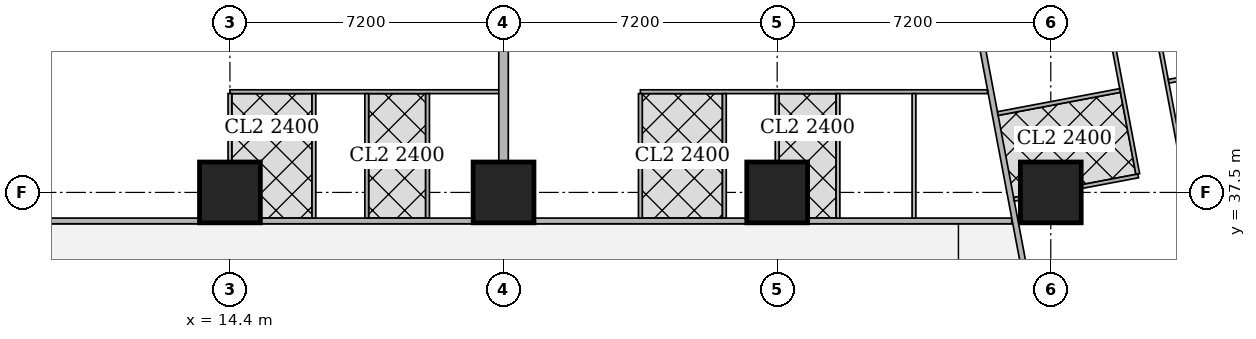
"""IFC4 building model, lengths in metres.
Left out: names, types, materials, properties, quantities, classifications, styles, units other than length and angle.
Written with IfcOpenShell. Run it as: python <this file> out.ifc"""

import sys

from ifc_helpers import new_model, si_unit, direction, frame, frame_2d, origin, origin_2d, place, context, subcontext, project, spatial, rectangle, extrude, element, fill, save


model = new_model("IFC4")
c1 = context("Model", 3, precision=1e-05, world=origin(), true_north=direction((0.0, 1.0)))
c2 = subcontext(c1, "Body", "Model", "MODEL_VIEW")
j1 = project(units=[si_unit("LENGTHUNIT", "METRE"), si_unit("PLANEANGLEUNIT", "RADIAN")], contexts=[c1])
p1 = place(None, origin())
s1 = spatial("IfcSite", under=j1, at=p1, CompositionType="ELEMENT")
p2 = place(p1, origin())
s2 = spatial("IfcBuilding", under=s1, at=p2, CompositionType="ELEMENT")
p3 = place(p2, frame((0.0, 0.0, 100.4)))
s3 = spatial("IfcBuildingStorey", under=s2, at=p3, CompositionType="ELEMENT", Elevation=100.4)
for number, where, z_axis, x_axis in (
    (1, (14.4, 37.5, 0.0), (0.0, 0.0, 1.0), (1.0, 0.0, 0.0)),
    (2, (21.6, 37.5, 0.0), (0.0, 0.0, 1.0), (1.0, 0.0, 0.0)),
    (3, (28.8, 37.5, 0.0), (0.0, 0.0, 1.0), (1.0, 0.0, 0.0)),
    (4, (36.0, 37.5, 0.0), (0.0, 0.0, 1.0), (1.0, 0.0, 0.0)),
):
    element("IfcColumn", number, at=place(p3, frame(where, z_axis=z_axis, x_axis=x_axis)), inside=s3, PredefinedType="COLUMN", context=c2, shape_type="SweptSolid", body=[
        extrude(rectangle(XDim=1.6, YDim=1.6, at=origin_2d()), origin(), (0.0, 0.0, 1.0), 3.75),
    ])
p4 = place(p3, frame((8.1, 36.75, 0.0), z_axis=(0.0, 0.0, 1.0), x_axis=(1.0, 0.0, 0.0)))
e5 = element("IfcWall", 5, at=p4, inside=s3, PredefinedType="SOLIDWALL", context=c2, shape_type="SweptSolid", body=[
    extrude(rectangle(XDim=5.499, YDim=0.15, at=frame_2d((2.75, 0.0))), origin(), (0.0, 0.0, 1.0), 3.5),
])
p5 = place(p4, frame((2.725, 0.0, 0.0)))
e6 = element("IfcOpeningElement", 6, at=p5, cuts=e5, PredefinedType="OPENING", context=c2, shape_type="SweptSolid", body=[
    extrude(rectangle(XDim=1.0, YDim=2.1, at=frame_2d((0.5, 1.05))), frame((0.0, 0.085, 0.0), z_axis=(0.0, -1.0, 0.0), x_axis=(1.0, 0.0, 0.0)), (0.0, 0.0, 1.0), 0.17),
])
p6 = place(p3, frame((15.201, 36.75, 0.0), z_axis=(0.0, 0.0, 1.0), x_axis=(1.0, 0.0, 0.0)))
e7 = element("IfcWall", 7, at=p6, inside=s3, PredefinedType="SOLIDWALL", context=c2, shape_type="SweptSolid", body=[
    extrude(rectangle(XDim=5.598, YDim=0.15, at=frame_2d((2.799, 0.0))), origin(), (0.0, 0.0, 1.0), 3.5),
])
p7 = place(p3, frame((22.401, 36.75, 0.0), z_axis=(0.0, 0.0, 1.0), x_axis=(1.0, 0.0, 0.0)))
e8 = element("IfcWall", 8, at=p7, inside=s3, PredefinedType="SOLIDWALL", context=c2, shape_type="SweptSolid", body=[
    extrude(rectangle(XDim=5.598, YDim=0.15, at=frame_2d((2.799, 0.0))), origin(), (0.0, 0.0, 1.0), 3.5),
])
p8 = place(p7, frame((0.699, 0.0, 0.0)))
e9 = element("IfcOpeningElement", 9, at=p8, cuts=e8, PredefinedType="OPENING", context=c2, shape_type="SweptSolid", body=[
    extrude(rectangle(XDim=1.0, YDim=2.1, at=frame_2d((0.5, 1.05))), frame((0.0, 0.085, 0.0), z_axis=(0.0, -1.0, 0.0), x_axis=(1.0, 0.0, 0.0)), (0.0, 0.0, 1.0), 0.17),
])
p9 = place(p3, frame((29.601, 36.75, 0.0), z_axis=(0.0, 0.0, 1.0), x_axis=(1.0, 0.0, 0.0)))
e10 = element("IfcWall", 10, at=p9, inside=s3, PredefinedType="SOLIDWALL", context=c2, shape_type="SweptSolid", body=[
    extrude(rectangle(XDim=5.372, YDim=0.15, at=frame_2d((2.686, 0.0))), origin(), (0.0, 0.0, 1.0), 3.5),
])
p10 = place(p3, frame((33.382, 45.65, 0.0), z_axis=(0.0, 0.0, 1.0), x_axis=(0.185593544777, -0.982626600565, 0.0)))
e11 = element("IfcWall", 11, at=p10, inside=s3, PredefinedType="SOLIDWALL", context=c2, shape_type="SweptSolid", body=[
    extrude(rectangle(XDim=47.118, YDim=0.15, at=frame_2d((23.559, 0.0))), origin(), (0.0, 0.0, 1.0), 2.2),
])
p11 = place(p10, frame((10.662, 0.0, 0.0)))
e12 = element("IfcOpeningElement", 12, at=p11, cuts=e11, PredefinedType="OPENING", context=c2, shape_type="SweptSolid", body=[
    extrude(rectangle(XDim=1.0, YDim=2.1, at=frame_2d((0.5, 1.05))), frame((0.0, 0.085, 0.0), z_axis=(0.0, -1.0, 0.0), x_axis=(1.0, 0.0, 0.0)), (0.0, 0.0, 1.0), 0.17),
])
p12 = place(p10, frame((15.237, 0.0, 0.0)))
e13 = element("IfcOpeningElement", 13, at=p12, cuts=e11, PredefinedType="OPENING", context=c2, shape_type="SweptSolid", body=[
    extrude(rectangle(XDim=1.0, YDim=2.1, at=frame_2d((0.5, 1.05))), frame((0.0, 0.085, 0.0), z_axis=(0.0, -1.0, 0.0), x_axis=(1.0, 0.0, 0.0)), (0.0, 0.0, 1.0), 0.17),
])
p13 = place(p10, frame((27.341, 0.0, 0.0)))
e14 = element("IfcOpeningElement", 14, at=p13, cuts=e11, PredefinedType="OPENING", context=c2, shape_type="SweptSolid", body=[
    extrude(rectangle(XDim=1.0, YDim=2.1, at=frame_2d((0.5, 1.05))), frame((0.0, 0.085, 0.0), z_axis=(0.0, -1.0, 0.0), x_axis=(1.0, 0.0, 0.0)), (0.0, 0.0, 1.0), 0.17),
])
p14 = place(p10, frame((33.833, 0.0, 0.0)))
e15 = element("IfcOpeningElement", 15, at=p14, cuts=e11, PredefinedType="OPENING", context=c2, shape_type="SweptSolid", body=[
    extrude(rectangle(XDim=1.0, YDim=2.1, at=frame_2d((0.5, 1.05))), frame((0.0, 0.085, 0.0), z_axis=(0.0, -1.0, 0.0), x_axis=(1.0, 0.0, 0.0)), (0.0, 0.0, 1.0), 0.17),
])
p15 = place(p3, frame((38.862, 41.42, 0.0), z_axis=(0.0, 0.0, 1.0), x_axis=(0.185332907641, -0.982675792592, 0.0)))
e16 = element("IfcWall", 16, at=p15, inside=s3, PredefinedType="PARTITIONING", context=c2, shape_type="SweptSolid", body=[
    extrude(rectangle(XDim=4.629, YDim=0.1, at=frame_2d((2.314, 0.0))), origin(), (0.0, 0.0, 1.0), 3.5),
])
p16 = place(p15, frame((2.22, 0.0, 0.0)))
e17 = element("IfcOpeningElement", 17, at=p16, cuts=e16, PredefinedType="OPENING", context=c2, shape_type="SweptSolid", body=[
    extrude(rectangle(XDim=0.9, YDim=2.1, at=frame_2d((0.45, 1.05))), frame((0.0, 0.06, 0.0), z_axis=(0.0, -1.0, 0.0), x_axis=(1.0, 0.0, 0.0)), (0.0, 0.0, 1.0), 0.12),
])
p17 = place(p3, frame((37.472, 42.309, 0.0), z_axis=(0.0, 0.0, 1.0), x_axis=(0.185641287362, -0.982617581985, 0.0)))
e18 = element("IfcWall", 18, at=p17, inside=s3, PredefinedType="PARTITIONING", context=c2, shape_type="SweptSolid", body=[
    extrude(rectangle(XDim=4.402, YDim=0.1, at=frame_2d((2.201, 0.0))), origin(), (0.0, 0.0, 1.0), 3.5),
])
p18 = place(p17, frame((2.854, 0.0, 0.0)))
e19 = element("IfcOpeningElement", 19, at=p18, cuts=e18, PredefinedType="OPENING", context=c2, shape_type="SweptSolid", body=[
    extrude(rectangle(XDim=0.9, YDim=2.1, at=frame_2d((0.45, 1.05))), frame((0.0, 0.06, 0.0), z_axis=(0.0, -1.0, 0.0), x_axis=(1.0, 0.0, 0.0)), (0.0, 0.0, 1.0), 0.12),
])
p19 = place(p3, frame((43.277, 41.212, 0.0), z_axis=(0.0, 0.0, 1.0), x_axis=(-0.982665405803, -0.185387972203, 0.0)))
e20 = element("IfcWall", 20, at=p19, inside=s3, PredefinedType="PARTITIONING", context=c2, shape_type="SweptSolid", body=[
    extrude(rectangle(XDim=4.25, YDim=0.1, at=frame_2d((2.125, 0.0))), origin(), (0.0, 0.0, 1.0), 2.05),
])
p20 = place(p3, frame((37.823, 40.182, 0.0), z_axis=(0.0, 0.0, 1.0), x_axis=(-0.982664729897, -0.18539155487, 0.0)))
e21 = element("IfcWall", 21, at=p20, inside=s3, PredefinedType="PARTITIONING", context=c2, shape_type="SweptSolid", body=[
    extrude(rectangle(XDim=3.274, YDim=0.1, at=frame_2d((1.637, 0.0))), origin(), (0.0, 0.0, 1.0), 3.5),
])
p21 = place(p3, frame((38.299, 37.935, 0.0), z_axis=(0.0, 0.0, 1.0), x_axis=(-0.982536828695, -0.186068213993, 0.0)))
e22 = element("IfcWall", 22, at=p21, inside=s3, PredefinedType="PARTITIONING", context=c2, shape_type="SweptSolid", body=[
    extrude(rectangle(XDim=1.515, YDim=0.1, at=frame_2d((0.758, 0.0))), origin(), (0.0, 0.0, 1.0), 3.5),
])
p22 = place(p3, frame((35.19, 37.347, 0.0), z_axis=(0.0, 0.0, 1.0), x_axis=(-0.982404955251, -0.186763229514, 0.0)))
e23 = element("IfcWall", 23, at=p22, inside=s3, PredefinedType="PARTITIONING", context=c2, shape_type="SweptSolid", body=[
    extrude(rectangle(XDim=0.161, YDim=0.1, at=frame_2d((0.081, 0.0))), origin(), (0.0, 0.0, 1.0), 3.5),
])
p23 = place(p3, frame((14.4, 40.15, 0.0), z_axis=(0.0, 0.0, 1.0), x_axis=(1.0, 0.0, 0.0)))
e24 = element("IfcWall", 24, at=p23, inside=s3, PredefinedType="PARTITIONING", context=c2, shape_type="SweptSolid", body=[
    extrude(rectangle(XDim=7.075, YDim=0.1, at=frame_2d((3.538, 0.0))), origin(), (0.0, 0.0, 1.0), 3.5),
])
p24 = place(p23, frame((0.655, 0.0, 0.0)))
e25 = element("IfcOpeningElement", 25, at=p24, cuts=e24, PredefinedType="OPENING", context=c2, shape_type="SweptSolid", body=[
    extrude(rectangle(XDim=0.9, YDim=2.1, at=frame_2d((0.45, 1.05))), frame((0.0, 0.06, 0.0), z_axis=(0.0, -1.0, 0.0), x_axis=(1.0, 0.0, 0.0)), (0.0, 0.0, 1.0), 0.12),
])
p25 = place(p23, frame((3.95, 0.0, 0.0)))
e26 = element("IfcOpeningElement", 26, at=p25, cuts=e24, PredefinedType="OPENING", context=c2, shape_type="SweptSolid", body=[
    extrude(rectangle(XDim=0.9, YDim=2.1, at=frame_2d((0.45, 1.05))), frame((0.0, 0.06, 0.0), z_axis=(0.0, -1.0, 0.0), x_axis=(1.0, 0.0, 0.0)), (0.0, 0.0, 1.0), 0.12),
])
p26 = place(p23, frame((2.455, 0.0, 0.0)))
e27 = element("IfcOpeningElement", 27, at=p26, cuts=e24, PredefinedType="OPENING", context=c2, shape_type="SweptSolid", body=[
    extrude(rectangle(XDim=0.9, YDim=2.1, at=frame_2d((0.45, 1.05))), frame((0.0, 0.06, 0.0), z_axis=(0.0, -1.0, 0.0), x_axis=(1.0, 0.0, 0.0)), (0.0, 0.0, 1.0), 0.12),
])
p27 = place(p23, frame((5.75, 0.0, 0.0)))
e28 = element("IfcOpeningElement", 28, at=p27, cuts=e24, PredefinedType="OPENING", context=c2, shape_type="SweptSolid", body=[
    extrude(rectangle(XDim=0.9, YDim=2.1, at=frame_2d((0.45, 1.05))), frame((0.0, 0.06, 0.0), z_axis=(0.0, -1.0, 0.0), x_axis=(1.0, 0.0, 0.0)), (0.0, 0.0, 1.0), 0.12),
])
p28 = place(p3, frame((14.4, 38.301, 0.0), z_axis=(0.0, 0.0, 1.0), x_axis=(0.0, 1.0, 0.0)))
e29 = element("IfcWall", 29, at=p28, inside=s3, PredefinedType="PARTITIONING", context=c2, shape_type="SweptSolid", body=[
    extrude(rectangle(XDim=1.799, YDim=0.1, at=frame_2d((0.899, 0.0))), origin(), (0.0, 0.0, 1.0), 3.5),
])
for number, where, z_axis, x_axis in (
    (30, (18.0, 36.825, 0.0), (0.0, 0.0, 1.0), (0.0, 1.0, 0.0)),
    (31, (16.61, 36.825, 0.0), (0.0, 0.0, 1.0), (0.0, 1.0, 0.0)),
    (32, (19.6, 36.825, 0.0), (0.0, 0.0, 1.0), (0.0, 1.0, 0.0)),
):
    element("IfcWall", number, at=place(p3, frame(where, z_axis=z_axis, x_axis=x_axis)), inside=s3, PredefinedType="PARTITIONING", context=c2, shape_type="SweptSolid", body=[
        extrude(rectangle(XDim=3.275, YDim=0.1, at=frame_2d((1.638, 0.0))), origin(), (0.0, 0.0, 1.0), 3.5),
    ])
p29 = place(p3, frame((25.2, 40.15, 0.0), z_axis=(0.0, 0.0, 1.0), x_axis=(1.0, 0.0, 0.0)))
e33 = element("IfcWall", 33, at=p29, inside=s3, PredefinedType="PARTITIONING", context=c2, shape_type="SweptSolid", body=[
    extrude(rectangle(XDim=9.135, YDim=0.1, at=frame_2d((4.567, 0.0))), origin(), (0.0, 0.0, 1.0), 3.5),
])
p30 = place(p29, frame((0.655, 0.0, 0.0)))
e34 = element("IfcOpeningElement", 34, at=p30, cuts=e33, PredefinedType="OPENING", context=c2, shape_type="SweptSolid", body=[
    extrude(rectangle(XDim=0.9, YDim=2.1, at=frame_2d((0.45, 1.05))), frame((0.0, 0.06, 0.0), z_axis=(0.0, -1.0, 0.0), x_axis=(1.0, 0.0, 0.0)), (0.0, 0.0, 1.0), 0.12),
])
p31 = place(p29, frame((3.95, 0.0, 0.0)))
e35 = element("IfcOpeningElement", 35, at=p31, cuts=e33, PredefinedType="OPENING", context=c2, shape_type="SweptSolid", body=[
    extrude(rectangle(XDim=0.9, YDim=2.1, at=frame_2d((0.45, 1.05))), frame((0.0, 0.06, 0.0), z_axis=(0.0, -1.0, 0.0), x_axis=(1.0, 0.0, 0.0)), (0.0, 0.0, 1.0), 0.12),
])
p32 = place(p29, frame((8.081, 0.0, 0.0)))
e36 = element("IfcOpeningElement", 36, at=p32, cuts=e33, PredefinedType="OPENING", context=c2, shape_type="SweptSolid", body=[
    extrude(rectangle(XDim=0.9, YDim=2.1, at=frame_2d((0.45, 1.05))), frame((0.0, 0.06, 0.0), z_axis=(0.0, -1.0, 0.0), x_axis=(1.0, 0.0, 0.0)), (0.0, 0.0, 1.0), 0.12),
])
p33 = place(p29, frame((2.455, 0.0, 0.0)))
e37 = element("IfcOpeningElement", 37, at=p33, cuts=e33, PredefinedType="OPENING", context=c2, shape_type="SweptSolid", body=[
    extrude(rectangle(XDim=0.9, YDim=2.1, at=frame_2d((0.45, 1.05))), frame((0.0, 0.06, 0.0), z_axis=(0.0, -1.0, 0.0), x_axis=(1.0, 0.0, 0.0)), (0.0, 0.0, 1.0), 0.12),
])
p34 = place(p29, frame((5.75, 0.0, 0.0)))
e38 = element("IfcOpeningElement", 38, at=p34, cuts=e33, PredefinedType="OPENING", context=c2, shape_type="SweptSolid", body=[
    extrude(rectangle(XDim=0.9, YDim=2.1, at=frame_2d((0.45, 1.05))), frame((0.0, 0.06, 0.0), z_axis=(0.0, -1.0, 0.0), x_axis=(1.0, 0.0, 0.0)), (0.0, 0.0, 1.0), 0.12),
])
p35 = place(p3, frame((25.2, 36.825, 0.0), z_axis=(0.0, 0.0, 1.0), x_axis=(0.0, 1.0, 0.0)))
e39 = element("IfcWall", 39, at=p35, inside=s3, PredefinedType="PARTITIONING", context=c2, shape_type="SweptSolid", body=[
    extrude(rectangle(XDim=3.275, YDim=0.1, at=frame_2d((1.638, 0.0))), origin(), (0.0, 0.0, 1.0), 3.5),
])
p36 = place(p3, frame((28.8, 38.301, 0.0), z_axis=(0.0, 0.0, 1.0), x_axis=(0.0, 1.0, 0.0)))
e40 = element("IfcWall", 40, at=p36, inside=s3, PredefinedType="PARTITIONING", context=c2, shape_type="SweptSolid", body=[
    extrude(rectangle(XDim=1.799, YDim=0.1, at=frame_2d((0.899, 0.0))), origin(), (0.0, 0.0, 1.0), 3.5),
])
for number, where, z_axis, x_axis in (
    (41, (32.4, 36.825, 0.0), (0.0, 0.0, 1.0), (0.0, 1.0, 0.0)),
    (42, (27.41, 36.825, 0.0), (0.0, 0.0, 1.0), (0.0, 1.0, 0.0)),
    (43, (30.4, 36.825, 0.0), (0.0, 0.0, 1.0), (0.0, 1.0, 0.0)),
):
    element("IfcWall", number, at=place(p3, frame(where, z_axis=z_axis, x_axis=x_axis)), inside=s3, PredefinedType="PARTITIONING", context=c2, shape_type="SweptSolid", body=[
        extrude(rectangle(XDim=3.275, YDim=0.1, at=frame_2d((1.638, 0.0))), origin(), (0.0, 0.0, 1.0), 3.5),
    ])
p37 = place(p3, frame((21.6, 38.301, 0.0), z_axis=(0.0, 0.0, 1.0), x_axis=(0.0, 1.0, 0.0)))
e44 = element("IfcWall", 44, at=p37, inside=s3, PredefinedType="SOLIDWALL", context=c2, shape_type="SweptSolid", body=[
    extrude(rectangle(XDim=3.049, YDim=0.25, at=frame_2d((1.524, 0.0))), origin(), (0.0, 0.0, 1.0), 3.5),
])
p38 = place(p16, origin())
e45 = element("IfcDoor", 45, at=p38, inside=s3, OperationType="SINGLE_SWING_LEFT", PredefinedType="DOOR", context=c2, shape_type="SweptSolid", body=[
    extrude(rectangle(XDim=0.9, YDim=2.1, at=frame_2d((0.45, 1.05))), frame((0.0, 0.025, 0.0), z_axis=(0.0, -1.0, 0.0), x_axis=(1.0, 0.0, 0.0)), (0.0, 0.0, 1.0), 0.05),
])
fill(e17, e45)
p39 = place(p18, origin())
e46 = element("IfcDoor", 46, at=p39, inside=s3, OperationType="SINGLE_SWING_LEFT", PredefinedType="DOOR", context=c2, shape_type="SweptSolid", body=[
    extrude(rectangle(XDim=0.9, YDim=2.1, at=frame_2d((0.45, 1.05))), frame((0.0, 0.025, 0.0), z_axis=(0.0, -1.0, 0.0), x_axis=(1.0, 0.0, 0.0)), (0.0, 0.0, 1.0), 0.05),
])
fill(e19, e46)
p40 = place(p24, origin())
e47 = element("IfcDoor", 47, at=p40, inside=s3, OperationType="SINGLE_SWING_RIGHT", PredefinedType="DOOR", context=c2, shape_type="SweptSolid", body=[
    extrude(rectangle(XDim=0.9, YDim=2.1, at=frame_2d((0.45, 1.05))), frame((0.0, 0.025, 0.0), z_axis=(0.0, -1.0, 0.0), x_axis=(1.0, 0.0, 0.0)), (0.0, 0.0, 1.0), 0.05),
])
fill(e25, e47)
p41 = place(p25, origin())
e48 = element("IfcDoor", 48, at=p41, inside=s3, OperationType="SINGLE_SWING_LEFT", PredefinedType="DOOR", context=c2, shape_type="SweptSolid", body=[
    extrude(rectangle(XDim=0.9, YDim=2.1, at=frame_2d((0.45, 1.05))), frame((0.0, 0.025, 0.0), z_axis=(0.0, -1.0, 0.0), x_axis=(1.0, 0.0, 0.0)), (0.0, 0.0, 1.0), 0.05),
])
fill(e26, e48)
p42 = place(p26, origin())
e49 = element("IfcDoor", 49, at=p42, inside=s3, OperationType="SINGLE_SWING_LEFT", PredefinedType="DOOR", context=c2, shape_type="SweptSolid", body=[
    extrude(rectangle(XDim=0.9, YDim=2.1, at=frame_2d((0.45, 1.05))), frame((0.0, 0.025, 0.0), z_axis=(0.0, -1.0, 0.0), x_axis=(1.0, 0.0, 0.0)), (0.0, 0.0, 1.0), 0.05),
])
fill(e27, e49)
p43 = place(p27, origin())
e50 = element("IfcDoor", 50, at=p43, inside=s3, OperationType="SINGLE_SWING_LEFT", PredefinedType="DOOR", context=c2, shape_type="SweptSolid", body=[
    extrude(rectangle(XDim=0.9, YDim=2.1, at=frame_2d((0.45, 1.05))), frame((0.0, 0.025, 0.0), z_axis=(0.0, -1.0, 0.0), x_axis=(1.0, 0.0, 0.0)), (0.0, 0.0, 1.0), 0.05),
])
fill(e28, e50)
p44 = place(p5, origin())
e51 = element("IfcDoor", 51, at=p44, inside=s3, OperationType="SINGLE_SWING_LEFT", PredefinedType="DOOR", context=c2, shape_type="SweptSolid", body=[
    extrude(rectangle(XDim=1.0, YDim=2.1, at=frame_2d((0.5, 1.05))), frame((0.0, 0.025, 0.0), z_axis=(0.0, -1.0, 0.0), x_axis=(1.0, 0.0, 0.0)), (0.0, 0.0, 1.0), 0.05),
])
fill(e6, e51)
p45 = place(p30, origin())
e52 = element("IfcDoor", 52, at=p45, inside=s3, OperationType="SINGLE_SWING_RIGHT", PredefinedType="DOOR", context=c2, shape_type="SweptSolid", body=[
    extrude(rectangle(XDim=0.9, YDim=2.1, at=frame_2d((0.45, 1.05))), frame((0.0, 0.025, 0.0), z_axis=(0.0, -1.0, 0.0), x_axis=(1.0, 0.0, 0.0)), (0.0, 0.0, 1.0), 0.05),
])
fill(e34, e52)
p46 = place(p31, origin())
e53 = element("IfcDoor", 53, at=p46, inside=s3, OperationType="SINGLE_SWING_RIGHT", PredefinedType="DOOR", context=c2, shape_type="SweptSolid", body=[
    extrude(rectangle(XDim=0.9, YDim=2.1, at=frame_2d((0.45, 1.05))), frame((0.0, 0.025, 0.0), z_axis=(0.0, -1.0, 0.0), x_axis=(1.0, 0.0, 0.0)), (0.0, 0.0, 1.0), 0.05),
])
fill(e35, e53)
p47 = place(p32, origin())
e54 = element("IfcDoor", 54, at=p47, inside=s3, OperationType="SINGLE_SWING_LEFT", PredefinedType="DOOR", context=c2, shape_type="SweptSolid", body=[
    extrude(rectangle(XDim=0.9, YDim=2.1, at=frame_2d((0.45, 1.05))), frame((0.0, 0.025, 0.0), z_axis=(0.0, -1.0, 0.0), x_axis=(1.0, 0.0, 0.0)), (0.0, 0.0, 1.0), 0.05),
])
fill(e36, e54)
p48 = place(p33, origin())
e55 = element("IfcDoor", 55, at=p48, inside=s3, OperationType="SINGLE_SWING_LEFT", PredefinedType="DOOR", context=c2, shape_type="SweptSolid", body=[
    extrude(rectangle(XDim=0.9, YDim=2.1, at=frame_2d((0.45, 1.05))), frame((0.0, 0.025, 0.0), z_axis=(0.0, -1.0, 0.0), x_axis=(1.0, 0.0, 0.0)), (0.0, 0.0, 1.0), 0.05),
])
fill(e37, e55)
p49 = place(p34, origin())
e56 = element("IfcDoor", 56, at=p49, inside=s3, OperationType="SINGLE_SWING_LEFT", PredefinedType="DOOR", context=c2, shape_type="SweptSolid", body=[
    extrude(rectangle(XDim=0.9, YDim=2.1, at=frame_2d((0.45, 1.05))), frame((0.0, 0.025, 0.0), z_axis=(0.0, -1.0, 0.0), x_axis=(1.0, 0.0, 0.0)), (0.0, 0.0, 1.0), 0.05),
])
fill(e38, e56)
p50 = place(p8, origin())
e57 = element("IfcDoor", 57, at=p50, inside=s3, OperationType="SINGLE_SWING_LEFT", PredefinedType="DOOR", context=c2, shape_type="SweptSolid", body=[
    extrude(rectangle(XDim=1.0, YDim=2.1, at=frame_2d((0.5, 1.05))), frame((0.0, 0.025, 0.0), z_axis=(0.0, -1.0, 0.0), x_axis=(1.0, 0.0, 0.0)), (0.0, 0.0, 1.0), 0.05),
])
fill(e9, e57)
save(model, sys.argv[1])
